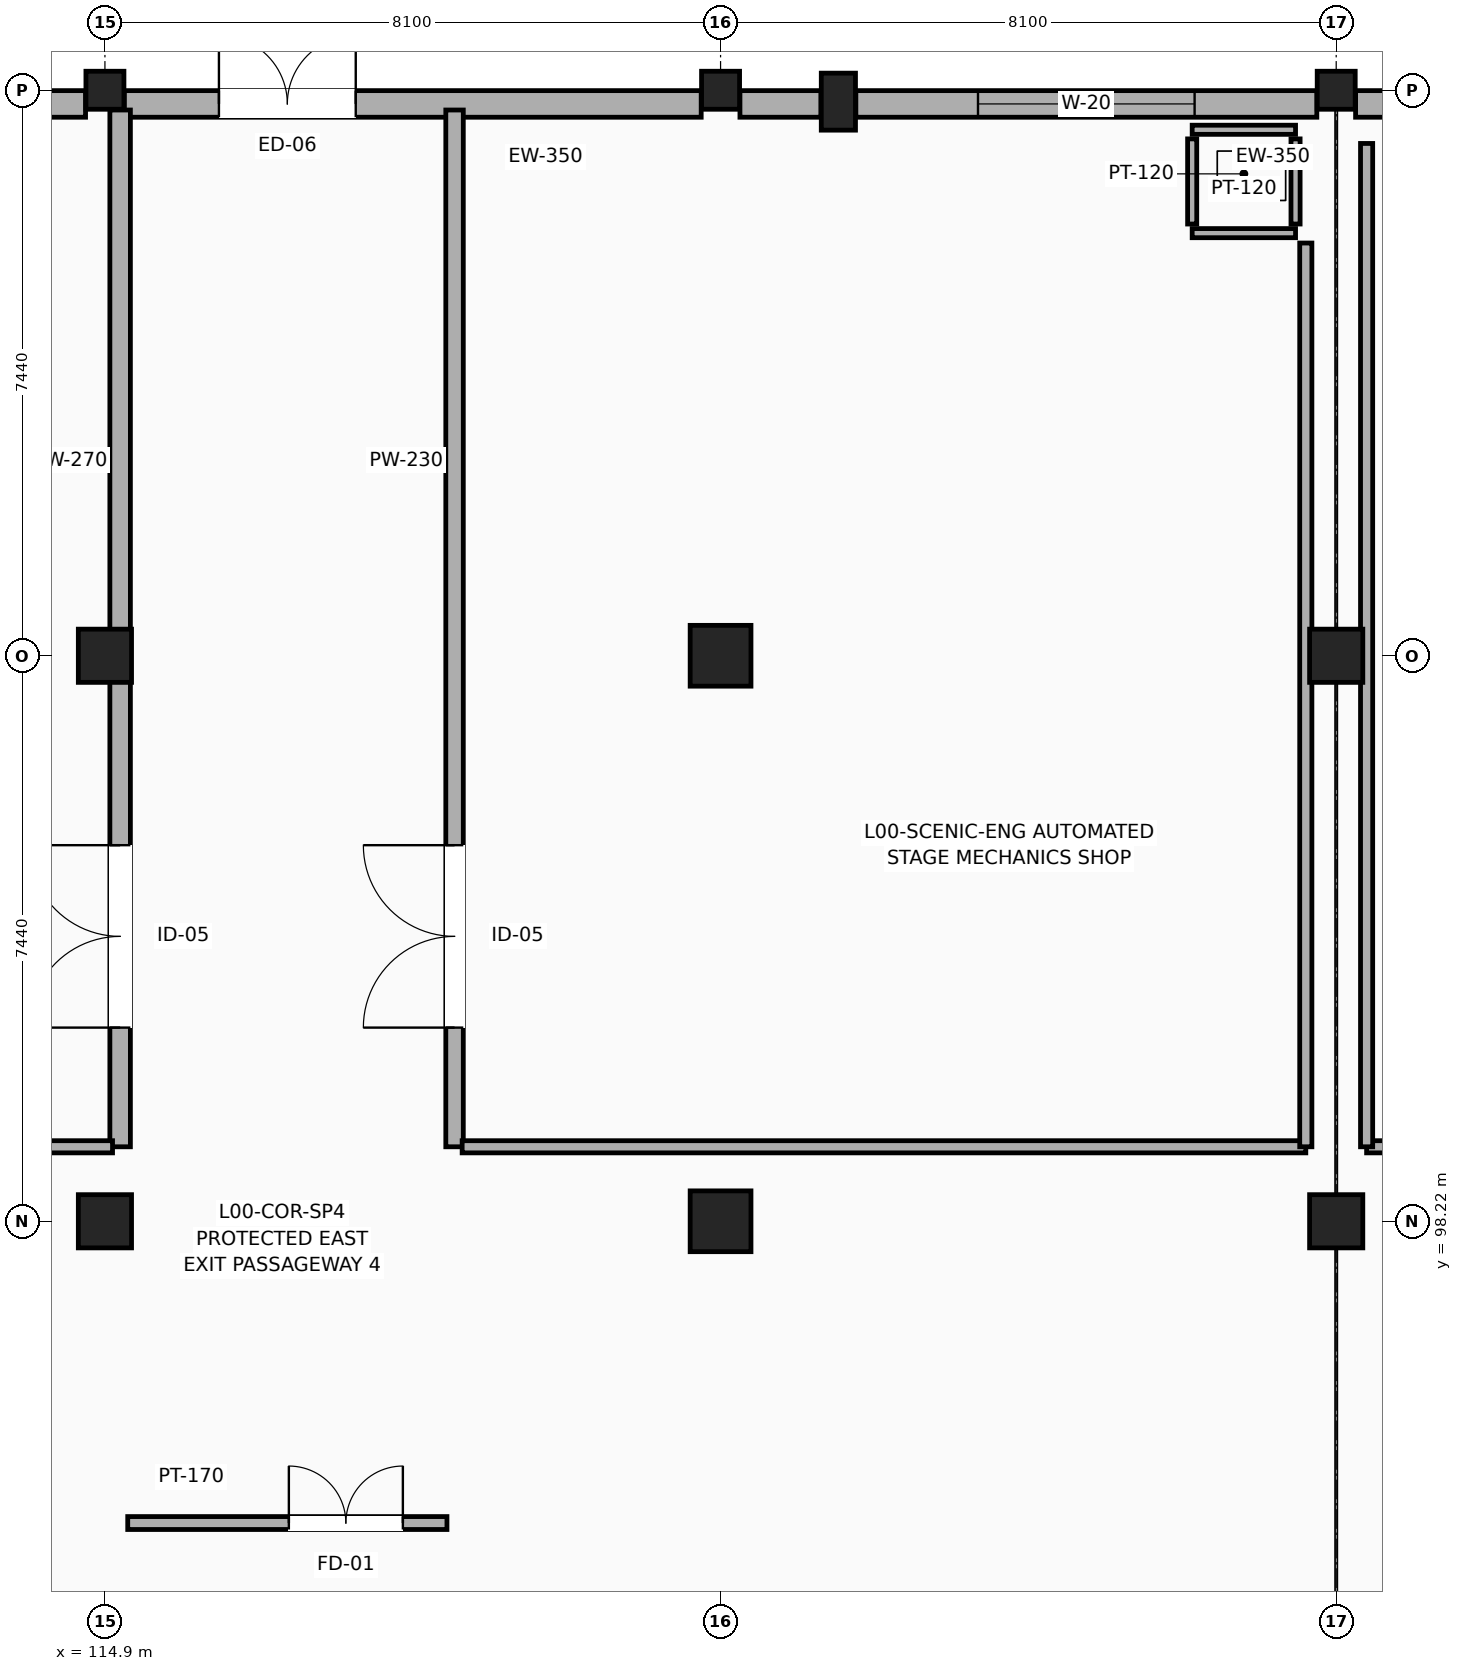
"""IFC4 building model, lengths in metres.
Left out: names, types, materials, properties, quantities, classifications, styles, units other than length and angle.
Written with IfcOpenShell. Run it as: python <this file> out.ifc"""

import sys

from ifc_helpers import new_model, si_unit, direction, frame, frame_2d, origin, origin_2d, place, context, subcontext, project, spatial, rectangle, extrude, element, fill, save


model = new_model("IFC4")
c1 = context("Model", 3, precision=1e-05, world=origin(), true_north=direction((0.0, 1.0)))
c2 = subcontext(c1, "Body", "Model", "MODEL_VIEW")
j1 = project(units=[si_unit("LENGTHUNIT", "METRE"), si_unit("PLANEANGLEUNIT", "RADIAN")], contexts=[c1])
p1 = place(None, origin())
s1 = spatial("IfcSite", under=j1, at=p1, CompositionType="ELEMENT")
p2 = place(p1, origin())
s2 = spatial("IfcBuilding", under=s1, at=p2, CompositionType="ELEMENT")
p3 = place(p2, origin())
s3 = spatial("IfcBuildingStorey", under=s2, at=p3, CompositionType="ELEMENT", Elevation=0.0)
p4 = place(p3, frame((124.55, 112.95, 0.0), z_axis=(0.0, 0.0, 1.0), x_axis=(1.0, 0.0, 0.0)))
e1 = element("IfcColumn", 1, at=p4, inside=s3, PredefinedType="PILASTER", context=c2, shape_type="SweptSolid", body=[
    extrude(rectangle(XDim=0.45, YDim=0.75, at=origin_2d()), origin(), (0.0, 0.0, 1.0), 5.4),
])
for number, where, z_axis, x_axis in (
    (2, (114.9, 98.22, 0.0), (0.0, 0.0, 1.0), (1.0, 0.0, 0.0)),
    (3, (114.9, 105.66, 0.0), (0.0, 0.0, 1.0), (1.0, 0.0, 0.0)),
):
    element("IfcColumn", number, at=place(p3, frame(where, z_axis=z_axis, x_axis=x_axis)), inside=s3, PredefinedType="COLUMN", context=c2, shape_type="SweptSolid", body=[
        extrude(rectangle(XDim=0.7, YDim=0.7, at=origin_2d()), origin(), (0.0, 0.0, 1.0), 5.4),
    ])
p5 = place(p3, frame((114.9, 113.1, 0.0), z_axis=(0.0, 0.0, 1.0), x_axis=(1.0, 0.0, 0.0)))
e4 = element("IfcColumn", 4, at=p5, inside=s3, PredefinedType="COLUMN", context=c2, shape_type="SweptSolid", body=[
    extrude(rectangle(XDim=0.5, YDim=0.5, at=origin_2d()), origin(), (0.0, 0.0, 1.0), 5.4),
])
for number, where, z_axis, x_axis in (
    (5, (123.0, 98.22, 0.0), (0.0, 0.0, 1.0), (1.0, 0.0, 0.0)),
    (6, (123.0, 105.66, 0.0), (0.0, 0.0, 1.0), (1.0, 0.0, 0.0)),
):
    element("IfcColumn", number, at=place(p3, frame(where, z_axis=z_axis, x_axis=x_axis)), inside=s3, PredefinedType="COLUMN", context=c2, shape_type="SweptSolid", body=[
        extrude(rectangle(XDim=0.8, YDim=0.8, at=origin_2d()), origin(), (0.0, 0.0, 1.0), 5.4),
    ])
p6 = place(p3, frame((123.0, 113.1, 0.0), z_axis=(0.0, 0.0, 1.0), x_axis=(1.0, 0.0, 0.0)))
e7 = element("IfcColumn", 7, at=p6, inside=s3, PredefinedType="COLUMN", context=c2, shape_type="SweptSolid", body=[
    extrude(rectangle(XDim=0.5, YDim=0.5, at=origin_2d()), origin(), (0.0, 0.0, 1.0), 5.4),
])
for number, where, z_axis, x_axis in (
    (8, (131.1, 98.22, 0.0), (0.0, 0.0, 1.0), (1.0, 0.0, 0.0)),
    (9, (131.1, 105.66, 0.0), (0.0, 0.0, 1.0), (1.0, 0.0, 0.0)),
):
    element("IfcColumn", number, at=place(p3, frame(where, z_axis=z_axis, x_axis=x_axis)), inside=s3, PredefinedType="COLUMN", context=c2, shape_type="SweptSolid", body=[
        extrude(rectangle(XDim=0.7, YDim=0.7, at=origin_2d()), origin(), (0.0, 0.0, 1.0), 5.4),
    ])
p7 = place(p3, frame((131.1, 113.1, 0.0), z_axis=(0.0, 0.0, 1.0), x_axis=(1.0, 0.0, 0.0)))
e10 = element("IfcColumn", 10, at=p7, inside=s3, PredefinedType="COLUMN", context=c2, shape_type="SweptSolid", body=[
    extrude(rectangle(XDim=0.5, YDim=0.5, at=origin_2d()), origin(), (0.0, 0.0, 1.0), 5.4),
])
p8 = place(p3, frame((108.555, 112.92, 0.0), z_axis=(0.0, 0.0, 1.0), x_axis=(1.0, 0.0, 0.0)))
e11 = element("IfcWall", 11, at=p8, inside=s3, PredefinedType="SOLIDWALL", context=c2, shape_type="SweptSolid", body=[
    extrude(rectangle(XDim=6.09, YDim=0.35, at=frame_2d((3.045, 0.0))), origin(), (0.0, 0.0, 1.0), 4.137),
])
p9 = place(p8, frame((2.22, 0.0, 0.9)))
e12 = element("IfcOpeningElement", 12, at=p9, cuts=e11, PredefinedType="OPENING", context=c2, shape_type="SweptSolid", body=[
    extrude(rectangle(XDim=1.65, YDim=2.25, at=frame_2d((0.825, 1.125))), frame((0.0, 0.185, 0.0), z_axis=(0.0, -1.0, 0.0), x_axis=(1.0, 0.0, 0.0)), (0.0, 0.0, 1.0), 0.37),
])
p10 = place(p3, frame((115.155, 112.92, 0.0), z_axis=(0.0, 0.0, 1.0), x_axis=(1.0, 0.0, 0.0)))
e13 = element("IfcWall", 13, at=p10, inside=s3, PredefinedType="SOLIDWALL", context=c2, shape_type="SweptSolid", body=[
    extrude(rectangle(XDim=7.59, YDim=0.35, at=frame_2d((3.795, 0.0))), origin(), (0.0, 0.0, 1.0), 4.137),
])
p11 = place(p10, frame((1.245, 0.0, 0.0)))
e14 = element("IfcOpeningElement", 14, at=p11, cuts=e13, PredefinedType="OPENING", context=c2, shape_type="SweptSolid", body=[
    extrude(rectangle(XDim=1.8, YDim=2.2, at=frame_2d((0.9, 1.1))), frame((0.0, 0.185, 0.0), z_axis=(0.0, -1.0, 0.0), x_axis=(1.0, 0.0, 0.0)), (0.0, 0.0, 1.0), 0.37),
])
p12 = place(p3, frame((124.78, 112.92, 0.0), z_axis=(0.0, 0.0, 1.0), x_axis=(1.0, 0.0, 0.0)))
e15 = element("IfcWall", 15, at=p12, inside=s3, PredefinedType="SOLIDWALL", context=c2, shape_type="SweptSolid", body=[
    extrude(rectangle(XDim=6.065, YDim=0.35, at=frame_2d((3.032, 0.0))), origin(), (0.0, 0.0, 1.0), 4.137),
])
p13 = place(p12, frame((1.607, 0.0, 0.9)))
e16 = element("IfcOpeningElement", 16, at=p13, cuts=e15, PredefinedType="OPENING", context=c2, shape_type="SweptSolid", body=[
    extrude(rectangle(XDim=2.85, YDim=1.65, at=frame_2d((1.425, 0.825))), frame((0.0, 0.185, 0.0), z_axis=(0.0, -1.0, 0.0), x_axis=(1.0, 0.0, 0.0)), (0.0, 0.0, 1.0), 0.37),
])
p14 = place(p3, frame((123.255, 112.92, 0.0), z_axis=(0.0, 0.0, 1.0), x_axis=(1.0, 0.0, 0.0)))
e17 = element("IfcWall", 17, at=p14, inside=s3, PredefinedType="SOLIDWALL", context=c2, shape_type="SweptSolid", body=[
    extrude(rectangle(XDim=1.065, YDim=0.35, at=frame_2d((0.533, 0.0))), origin(), (0.0, 0.0, 1.0), 4.137),
])
p15 = place(p3, frame((131.355, 112.92, 0.0), z_axis=(0.0, 0.0, 1.0), x_axis=(1.0, 0.0, 0.0)))
e18 = element("IfcWall", 18, at=p15, inside=s3, PredefinedType="SOLIDWALL", context=c2, shape_type="SweptSolid", body=[
    extrude(rectangle(XDim=7.59, YDim=0.35, at=frame_2d((3.795, 0.0))), origin(), (0.0, 0.0, 1.0), 4.137),
])
p16 = place(p15, frame((2.92, 0.0, 0.9)))
e19 = element("IfcOpeningElement", 19, at=p16, cuts=e18, PredefinedType="OPENING", context=c2, shape_type="SweptSolid", body=[
    extrude(rectangle(XDim=1.75, YDim=1.8, at=frame_2d((0.875, 0.9))), frame((0.0, 0.185, 0.0), z_axis=(0.0, -1.0, 0.0), x_axis=(1.0, 0.0, 0.0)), (0.0, 0.0, 1.0), 0.37),
])
for number, where, z_axis, x_axis in (
    (20, (129.205, 111.22, 0.0), (0.0, 0.0, 1.0), (1.0, 0.0, 0.0)),
    (21, (129.205, 112.58, 0.0), (0.0, 0.0, 1.0), (1.0, 0.0, 0.0)),
):
    element("IfcWall", number, at=place(p3, frame(where, z_axis=z_axis, x_axis=x_axis)), inside=s3, PredefinedType="PARTITIONING", context=c2, shape_type="SweptSolid", body=[
        extrude(rectangle(XDim=1.36, YDim=0.12, at=frame_2d((0.68, 0.0))), origin(), (0.0, 0.0, 1.0), 5.085),
    ])
for number, where, z_axis, x_axis in (
    (22, (129.205, 111.34, 0.0), (0.0, 0.0, 1.0), (0.0, 1.0, 0.0)),
    (23, (130.565, 111.34, 0.0), (0.0, 0.0, 1.0), (0.0, 1.0, 0.0)),
):
    element("IfcWall", number, at=place(p3, frame(where, z_axis=z_axis, x_axis=x_axis)), inside=s3, PredefinedType="PARTITIONING", context=c2, shape_type="SweptSolid", body=[
        extrude(rectangle(XDim=1.12, YDim=0.12, at=frame_2d((0.56, 0.0))), origin(), (0.0, 0.0, 1.0), 5.085),
    ])
p17 = place(p3, frame((115.2, 94.25, 0.0), z_axis=(0.0, 0.0, 1.0), x_axis=(1.0, 0.0, 0.0)))
e24 = element("IfcWall", 24, at=p17, inside=s3, PredefinedType="PARTITIONING", context=c2, shape_type="SweptSolid", body=[
    extrude(rectangle(XDim=4.2, YDim=0.17, at=frame_2d((2.1, 0.0))), origin(), (0.0, 0.0, 1.0), 4.637),
])
p18 = place(p17, frame((2.12, 0.0, 0.0)))
e25 = element("IfcOpeningElement", 25, at=p18, cuts=e24, PredefinedType="OPENING", context=c2, shape_type="SweptSolid", body=[
    extrude(rectangle(XDim=1.5, YDim=2.2, at=frame_2d((0.75, 1.1))), frame((0.0, 0.095, 0.0), z_axis=(0.0, -1.0, 0.0), x_axis=(1.0, 0.0, 0.0)), (0.0, 0.0, 1.0), 0.19),
])
p19 = place(p3, frame((115.1, 99.2, 0.0), z_axis=(0.0, 0.0, 1.0), x_axis=(0.0, 1.0, 0.0)))
e26 = element("IfcWall", 26, at=p19, inside=s3, PredefinedType="SOLIDWALL", context=c2, shape_type="SweptSolid", body=[
    extrude(rectangle(XDim=13.64, YDim=0.27, at=frame_2d((6.82, 0.0))), origin(), (0.0, 0.0, 1.0), 4.137),
])
p20 = place(p19, frame((1.568, 0.0, 0.0)))
e27 = element("IfcOpeningElement", 27, at=p20, cuts=e26, PredefinedType="OPENING", context=c2, shape_type="SweptSolid", body=[
    extrude(rectangle(XDim=2.4, YDim=2.8, at=frame_2d((1.2, 1.4))), frame((0.0, 0.145, 0.0), z_axis=(0.0, -1.0, 0.0), x_axis=(1.0, 0.0, 0.0)), (0.0, 0.0, 1.0), 0.29),
])
p21 = place(p3, frame((119.5, 99.2, 0.0), z_axis=(0.0, 0.0, 1.0), x_axis=(0.0, 1.0, 0.0)))
e28 = element("IfcWall", 28, at=p21, inside=s3, PredefinedType="SOLIDWALL", context=c2, shape_type="SweptSolid", body=[
    extrude(rectangle(XDim=13.64, YDim=0.23, at=frame_2d((6.82, 0.0))), origin(), (0.0, 0.0, 1.0), 4.137),
])
p22 = place(p21, frame((1.568, 0.0, 0.0)))
e29 = element("IfcOpeningElement", 29, at=p22, cuts=e28, PredefinedType="OPENING", context=c2, shape_type="SweptSolid", body=[
    extrude(rectangle(XDim=2.4, YDim=2.8, at=frame_2d((1.2, 1.4))), frame((0.0, 0.125, 0.0), z_axis=(0.0, -1.0, 0.0), x_axis=(1.0, 0.0, 0.0)), (0.0, 0.0, 1.0), 0.25),
])
p23 = place(p3, frame((99.1, 99.2, 0.0), z_axis=(0.0, 0.0, 1.0), x_axis=(1.0, 0.0, 0.0)))
e30 = element("IfcWall", 30, at=p23, inside=s3, PredefinedType="PARTITIONING", context=c2, shape_type="SweptSolid", body=[
    extrude(rectangle(XDim=15.9, YDim=0.16, at=frame_2d((7.95, 0.0))), origin(), (0.0, 0.0, 1.0), 4.337),
])
p24 = place(p3, frame((119.6, 99.2, 0.0), z_axis=(0.0, 0.0, 1.0), x_axis=(1.0, 0.0, 0.0)))
e31 = element("IfcWall", 31, at=p24, inside=s3, PredefinedType="PARTITIONING", context=c2, shape_type="SweptSolid", body=[
    extrude(rectangle(XDim=11.1, YDim=0.16, at=frame_2d((5.55, 0.0))), origin(), (0.0, 0.0, 1.0), 4.337),
])
p25 = place(p3, frame((130.7, 99.2, 0.0), z_axis=(0.0, 0.0, 1.0), x_axis=(0.0, 1.0, 0.0)))
e32 = element("IfcWall", 32, at=p25, inside=s3, PredefinedType="PARTITIONING", context=c2, shape_type="SweptSolid", body=[
    extrude(rectangle(XDim=11.89, YDim=0.16, at=frame_2d((5.945, 0.0))), origin(), (0.0, 0.0, 1.0), 4.137),
])
p26 = place(p3, frame((131.5, 99.2, 0.0), z_axis=(0.0, 0.0, 1.0), x_axis=(1.0, 0.0, 0.0)))
e33 = element("IfcWall", 33, at=p26, inside=s3, PredefinedType="PARTITIONING", context=c2, shape_type="SweptSolid", body=[
    extrude(rectangle(XDim=11.65, YDim=0.16, at=frame_2d((5.825, 0.0))), origin(), (0.0, 0.0, 1.0), 4.337),
])
p27 = place(p3, frame((131.5, 99.2, 0.0), z_axis=(0.0, 0.0, 1.0), x_axis=(0.0, 1.0, 0.0)))
e34 = element("IfcWall", 34, at=p27, inside=s3, PredefinedType="PARTITIONING", context=c2, shape_type="SweptSolid", body=[
    extrude(rectangle(XDim=13.2, YDim=0.16, at=frame_2d((6.6, 0.0))), origin(), (0.0, 0.0, 1.0), 4.137),
])
p28 = place(p11, origin())
e35 = element("IfcDoor", 35, at=p28, inside=s3, OperationType="DOUBLE_DOOR_SINGLE_SWING", PredefinedType="DOOR", context=c2, shape_type="SweptSolid", body=[
    extrude(rectangle(XDim=1.8, YDim=2.2, at=frame_2d((0.9, 1.1))), frame((0.0, 0.025, 0.0), z_axis=(0.0, -1.0, 0.0), x_axis=(1.0, 0.0, 0.0)), (0.0, 0.0, 1.0), 0.05),
])
fill(e14, e35)
p29 = place(p13, origin())
e36 = element("IfcWindow", 36, at=p29, inside=s3, PartitioningType="SINGLE_PANEL", PredefinedType="WINDOW", context=c2, shape_type="SweptSolid", body=[
    extrude(rectangle(XDim=2.85, YDim=1.65, at=frame_2d((1.425, 0.825))), frame((0.0, 0.03, 0.0), z_axis=(0.0, -1.0, 0.0), x_axis=(1.0, 0.0, 0.0)), (0.0, 0.0, 1.0), 0.06),
])
fill(e16, e36)
p30 = place(p18, origin())
e37 = element("IfcDoor", 37, at=p30, inside=s3, OperationType="DOUBLE_DOOR_SINGLE_SWING", PredefinedType="DOOR", context=c2, shape_type="SweptSolid", body=[
    extrude(rectangle(XDim=1.5, YDim=2.2, at=frame_2d((0.75, 1.1))), frame((0.0, 0.025, 0.0), z_axis=(0.0, -1.0, 0.0), x_axis=(1.0, 0.0, 0.0)), (0.0, 0.0, 1.0), 0.05),
])
fill(e25, e37)
p31 = place(p20, origin())
e38 = element("IfcDoor", 38, at=p31, inside=s3, OperationType="DOUBLE_DOOR_SINGLE_SWING", PredefinedType="DOOR", context=c2, shape_type="SweptSolid", body=[
    extrude(rectangle(XDim=2.4, YDim=2.8, at=frame_2d((1.2, 1.4))), frame((0.0, 0.025, 0.0), z_axis=(0.0, -1.0, 0.0), x_axis=(1.0, 0.0, 0.0)), (0.0, 0.0, 1.0), 0.05),
])
fill(e27, e38)
p32 = place(p22, origin())
e39 = element("IfcDoor", 39, at=p32, inside=s3, OperationType="DOUBLE_DOOR_SINGLE_SWING", PredefinedType="DOOR", context=c2, shape_type="SweptSolid", body=[
    extrude(rectangle(XDim=2.4, YDim=2.8, at=frame_2d((1.2, 1.4))), frame((0.0, 0.025, 0.0), z_axis=(0.0, -1.0, 0.0), x_axis=(1.0, 0.0, 0.0)), (0.0, 0.0, 1.0), 0.05),
])
fill(e29, e39)
save(model, sys.argv[1])
